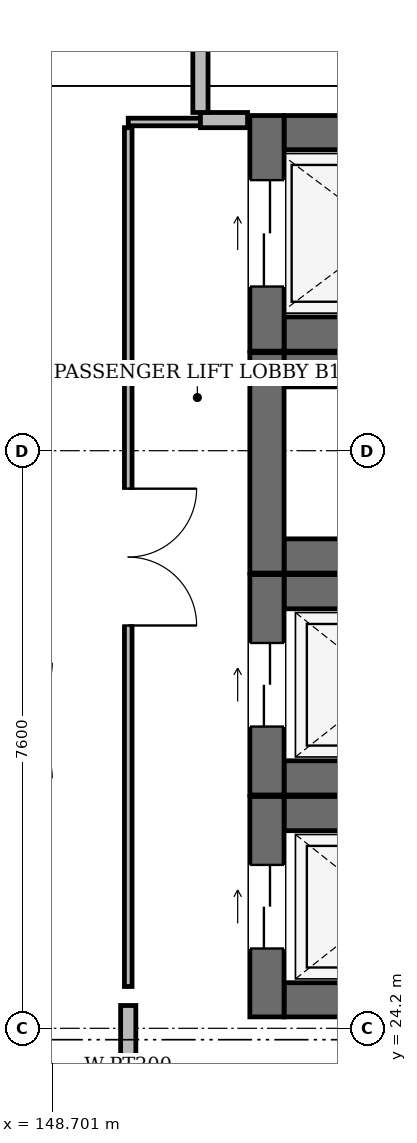
"""IFC4 building model, lengths in metres.
Left out: names, types, materials, properties, quantities, classifications, styles, units other than length and angle.
Written with IfcOpenShell. Run it as: python <this file> out.ifc"""

import sys

from ifc_helpers import new_model, si_unit, direction, frame, frame_2d, origin, place, context, subcontext, project, spatial, rectangle, extrude, element, fill, save


model = new_model("IFC4")
c1 = context("Model", 3, precision=1e-05, world=origin(), true_north=direction((0.0, 1.0)))
c2 = subcontext(c1, "Body", "Model", "MODEL_VIEW")
j1 = project(units=[si_unit("LENGTHUNIT", "METRE"), si_unit("PLANEANGLEUNIT", "RADIAN")], contexts=[c1])
p1 = place(None, origin())
s1 = spatial("IfcSite", under=j1, at=p1, CompositionType="ELEMENT")
p2 = place(p1, origin())
s2 = spatial("IfcBuilding", under=s1, at=p2, CompositionType="ELEMENT")
p3 = place(p2, frame((0.0, 0.0, -4.8)))
s3 = spatial("IfcBuildingStorey", under=s2, at=p3, CompositionType="ELEMENT", Elevation=-4.8)
for number, where, z_axis, x_axis in (
    (1, (151.75, 24.575, 0.0), (0.0, 0.0, 1.0), (1.0, 0.0, 0.0)),
    (2, (151.75, 27.025, 0.0), (0.0, 0.0, 1.0), (1.0, 0.0, 0.0)),
):
    element("IfcWall", number, at=place(p3, frame(where, z_axis=z_axis, x_axis=x_axis)), inside=s3, PredefinedType="SHEAR", context=c2, shape_type="SweptSolid", body=[
        extrude(rectangle(XDim=2.7, YDim=0.45, at=frame_2d((1.35, 0.0))), origin(), (0.0, 0.0, 1.0), 4.46),
    ])
p4 = place(p3, frame((151.525, 24.35, 0.0), z_axis=(0.0, 0.0, 1.0), x_axis=(0.0, 1.0, 0.0)))
e3 = element("IfcWall", 3, at=p4, inside=s3, PredefinedType="SHEAR", context=c2, shape_type="SweptSolid", body=[
    extrude(rectangle(XDim=2.9, YDim=0.45, at=frame_2d((1.45, 0.0))), origin(), (0.0, 0.0, 1.0), 4.46),
])
p5 = place(p4, frame((0.9, 0.0, 0.0)))
e4 = element("IfcOpeningElement", 4, at=p5, cuts=e3, PredefinedType="OPENING", context=c2, shape_type="SweptSolid", body=[
    extrude(rectangle(XDim=1.1, YDim=2.2, at=frame_2d((0.55, 1.1))), frame((0.0, 0.237, 0.0), z_axis=(0.0, -1.0, 0.0), x_axis=(1.0, 0.0, 0.0)), (0.0, 0.0, 1.0), 0.474),
])
for number, where, z_axis, x_axis in (
    (5, (151.75, 27.495, 0.0), (0.0, 0.0, 1.0), (1.0, 0.0, 0.0)),
    (6, (151.75, 29.945, 0.0), (0.0, 0.0, 1.0), (1.0, 0.0, 0.0)),
):
    element("IfcWall", number, at=place(p3, frame(where, z_axis=z_axis, x_axis=x_axis)), inside=s3, PredefinedType="SHEAR", context=c2, shape_type="SweptSolid", body=[
        extrude(rectangle(XDim=2.7, YDim=0.45, at=frame_2d((1.35, 0.0))), origin(), (0.0, 0.0, 1.0), 4.46),
    ])
p6 = place(p3, frame((151.525, 27.27, 0.0), z_axis=(0.0, 0.0, 1.0), x_axis=(0.0, 1.0, 0.0)))
e7 = element("IfcWall", 7, at=p6, inside=s3, PredefinedType="SHEAR", context=c2, shape_type="SweptSolid", body=[
    extrude(rectangle(XDim=2.9, YDim=0.45, at=frame_2d((1.45, 0.0))), origin(), (0.0, 0.0, 1.0), 4.46),
])
p7 = place(p6, frame((0.9, 0.0, 0.0)))
e8 = element("IfcOpeningElement", 8, at=p7, cuts=e7, PredefinedType="OPENING", context=c2, shape_type="SweptSolid", body=[
    extrude(rectangle(XDim=1.1, YDim=2.2, at=frame_2d((0.55, 1.1))), frame((0.0, 0.237, 0.0), z_axis=(0.0, -1.0, 0.0), x_axis=(1.0, 0.0, 0.0)), (0.0, 0.0, 1.0), 0.474),
])
for number, where, z_axis, x_axis in (
    (9, (151.75, 30.415, 0.0), (0.0, 0.0, 1.0), (1.0, 0.0, 0.0)),
    (10, (151.75, 32.865, 0.0), (0.0, 0.0, 1.0), (1.0, 0.0, 0.0)),
):
    element("IfcWall", number, at=place(p3, frame(where, z_axis=z_axis, x_axis=x_axis)), inside=s3, PredefinedType="SHEAR", context=c2, shape_type="SweptSolid", body=[
        extrude(rectangle(XDim=2.7, YDim=0.45, at=frame_2d((1.35, 0.0))), origin(), (0.0, 0.0, 1.0), 4.46),
    ])
p8 = place(p3, frame((151.525, 30.19, 0.0), z_axis=(0.0, 0.0, 1.0), x_axis=(0.0, 1.0, 0.0)))
e11 = element("IfcWall", 11, at=p8, inside=s3, PredefinedType="SHEAR", context=c2, shape_type="SweptSolid", body=[
    extrude(rectangle(XDim=2.9, YDim=0.45, at=frame_2d((1.45, 0.0))), origin(), (0.0, 0.0, 1.0), 4.46),
])
for number, where, z_axis, x_axis in (
    (12, (151.75, 33.335, 0.0), (0.0, 0.0, 1.0), (1.0, 0.0, 0.0)),
    (13, (151.75, 35.985, 0.0), (0.0, 0.0, 1.0), (1.0, 0.0, 0.0)),
):
    element("IfcWall", number, at=place(p3, frame(where, z_axis=z_axis, x_axis=x_axis)), inside=s3, PredefinedType="SHEAR", context=c2, shape_type="SweptSolid", body=[
        extrude(rectangle(XDim=2.7, YDim=0.45, at=frame_2d((1.35, 0.0))), origin(), (0.0, 0.0, 1.0), 4.46),
    ])
p9 = place(p3, frame((151.525, 33.11, 0.0), z_axis=(0.0, 0.0, 1.0), x_axis=(0.0, 1.0, 0.0)))
e14 = element("IfcWall", 14, at=p9, inside=s3, PredefinedType="SHEAR", context=c2, shape_type="SweptSolid", body=[
    extrude(rectangle(XDim=3.1, YDim=0.45, at=frame_2d((1.55, 0.0))), origin(), (0.0, 0.0, 1.0), 4.46),
])
p10 = place(p9, frame((0.85, 0.0, 0.0)))
e15 = element("IfcOpeningElement", 15, at=p10, cuts=e14, PredefinedType="OPENING", context=c2, shape_type="SweptSolid", body=[
    extrude(rectangle(XDim=1.4, YDim=2.3, at=frame_2d((0.7, 1.15))), frame((0.0, 0.237, 0.0), z_axis=(0.0, -1.0, 0.0), x_axis=(1.0, 0.0, 0.0)), (0.0, 0.0, 1.0), 0.474),
])
p11 = place(p3, frame((149.7, 24.75, 0.0), z_axis=(0.0, 0.0, 1.0), x_axis=(0.0, 1.0, 0.0)))
e16 = element("IfcWall", 16, at=p11, inside=s3, PredefinedType="PARTITIONING", context=c2, shape_type="SweptSolid", body=[
    extrude(rectangle(XDim=11.3, YDim=0.1, at=frame_2d((5.65, 0.0))), origin(), (0.0, 0.0, 1.0), 4.405),
])
p12 = place(p11, frame((4.75, 0.0, 0.0)))
e17 = element("IfcOpeningElement", 17, at=p12, cuts=e16, PredefinedType="OPENING", context=c2, shape_type="SweptSolid", body=[
    extrude(rectangle(XDim=1.8, YDim=2.4, at=frame_2d((0.9, 1.2))), frame((0.0, 0.062, 0.0), z_axis=(0.0, -1.0, 0.0), x_axis=(1.0, 0.0, 0.0)), (0.0, 0.0, 1.0), 0.124),
])
p13 = place(p3, frame((149.7, 36.125, 0.0), z_axis=(0.0, 0.0, 1.0), x_axis=(1.0, 0.0, 0.0)))
e18 = element("IfcWall", 18, at=p13, inside=s3, PredefinedType="PARTITIONING", context=c2, shape_type="SweptSolid", body=[
    extrude(rectangle(XDim=0.95, YDim=0.1, at=frame_2d((0.475, 0.0))), origin(), (0.0, 0.0, 1.0), 4.405),
])
p14 = place(p3, frame((150.65, 36.15, 0.0), z_axis=(0.0, 0.0, 1.0), x_axis=(1.0, 0.0, 0.0)))
e19 = element("IfcWall", 19, at=p14, inside=s3, PredefinedType="PARTITIONING", context=c2, shape_type="SweptSolid", body=[
    extrude(rectangle(XDim=0.62, YDim=0.2, at=frame_2d((0.31, 0.0))), origin(), (0.0, 0.0, 1.0), 4.405),
])
p15 = place(p3, frame((149.7, 24.5, 0.0), z_axis=(0.0, 0.0, 1.0), x_axis=(0.0, -1.0, 0.0)))
e20 = element("IfcWall", 20, at=p15, inside=s3, PredefinedType="PARTITIONING", context=c2, shape_type="SweptSolid", body=[
    extrude(rectangle(XDim=0.8, YDim=0.2, at=frame_2d((0.4, 0.0))), origin(), (0.0, 0.0, 1.0), 4.405),
])
p16 = place(p3, frame((150.65, 66.5, 0.0), z_axis=(0.0, 0.0, 1.0), x_axis=(0.0, -1.0, 0.0)))
e21 = element("IfcWall", 21, at=p16, inside=s3, PredefinedType="PARTITIONING", context=c2, shape_type="SweptSolid", body=[
    extrude(rectangle(XDim=30.25, YDim=0.2, at=frame_2d((15.125, 0.0))), origin(), (0.0, 0.0, 1.0), 4.405),
])
p17 = place(p16, frame((14.375, 0.0, 0.0)))
e22 = element("IfcOpeningElement", 22, at=p17, cuts=e21, PredefinedType="OPENING", context=c2, shape_type="SweptSolid", body=[
    extrude(rectangle(XDim=1.5, YDim=2.2, at=frame_2d((0.75, 1.1))), frame((0.0, 0.112, 0.0), z_axis=(0.0, -1.0, 0.0), x_axis=(1.0, 0.0, 0.0)), (0.0, 0.0, 1.0), 0.224),
])
p18 = place(p5, origin())
e23 = element("IfcDoor", 23, at=p18, inside=s3, OperationType="DOUBLE_DOOR_SLIDING", PredefinedType="DOOR", context=c2, shape_type="SweptSolid", body=[
    extrude(rectangle(XDim=1.1, YDim=2.2, at=frame_2d((0.55, 1.1))), frame((0.0, 0.025, 0.0), z_axis=(0.0, -1.0, 0.0), x_axis=(1.0, 0.0, 0.0)), (0.0, 0.0, 1.0), 0.05),
])
fill(e4, e23)
p19 = place(p7, origin())
e24 = element("IfcDoor", 24, at=p19, inside=s3, OperationType="DOUBLE_DOOR_SLIDING", PredefinedType="DOOR", context=c2, shape_type="SweptSolid", body=[
    extrude(rectangle(XDim=1.1, YDim=2.2, at=frame_2d((0.55, 1.1))), frame((0.0, 0.025, 0.0), z_axis=(0.0, -1.0, 0.0), x_axis=(1.0, 0.0, 0.0)), (0.0, 0.0, 1.0), 0.05),
])
fill(e8, e24)
p20 = place(p10, origin())
e25 = element("IfcDoor", 25, at=p20, inside=s3, OperationType="DOUBLE_DOOR_SLIDING", PredefinedType="DOOR", context=c2, shape_type="SweptSolid", body=[
    extrude(rectangle(XDim=1.4, YDim=2.3, at=frame_2d((0.7, 1.15))), frame((0.0, 0.025, 0.0), z_axis=(0.0, -1.0, 0.0), x_axis=(1.0, 0.0, 0.0)), (0.0, 0.0, 1.0), 0.05),
])
fill(e15, e25)
p21 = place(p12, frame((1.8, 0.0, 0.0), z_axis=(0.0, 0.0, 1.0), x_axis=(-1.0, 0.0, 0.0)))
e26 = element("IfcDoor", 26, at=p21, inside=s3, OperationType="DOUBLE_DOOR_SINGLE_SWING", PredefinedType="DOOR", context=c2, shape_type="SweptSolid", body=[
    extrude(rectangle(XDim=1.8, YDim=2.4, at=frame_2d((0.9, 1.2))), frame((0.0, 0.025, 0.0), z_axis=(0.0, -1.0, 0.0), x_axis=(1.0, 0.0, 0.0)), (0.0, 0.0, 1.0), 0.05),
])
fill(e17, e26)
save(model, sys.argv[1])
